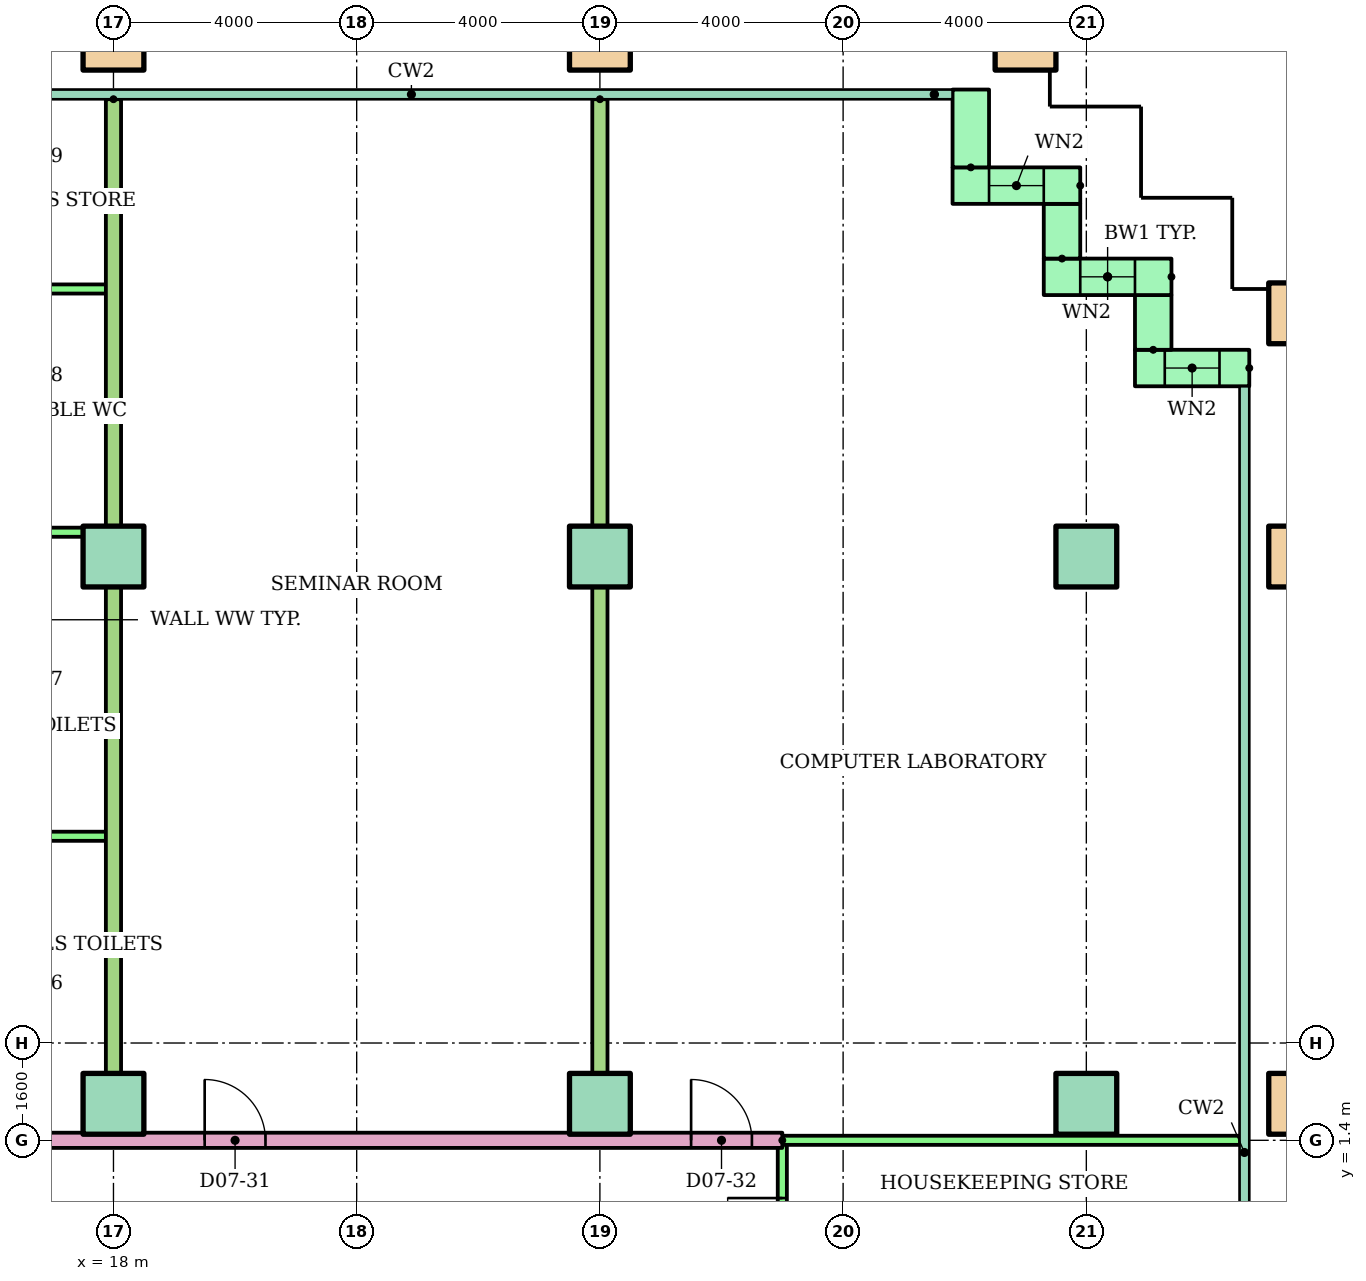
"""IFC4 building model, lengths in metres.
Left out: names, types, materials, properties, quantities, classifications, styles, units other than length and angle.
Written with IfcOpenShell. Run it as: python <this file> out.ifc"""

import sys

from ifc_helpers import new_model, si_unit, direction, frame, frame_2d, origin, origin_2d, place, context, subcontext, project, spatial, rectangle, hollow_rectangle, extrude, element, fill, save


model = new_model("IFC4")
c1 = context("Model", 3, precision=1e-05, world=origin(), true_north=direction((0.0, 1.0)))
c2 = subcontext(c1, "Body", "Model", "MODEL_VIEW")
j1 = project(units=[si_unit("LENGTHUNIT", "METRE"), si_unit("PLANEANGLEUNIT", "RADIAN")], contexts=[c1])
p1 = place(None, origin())
s1 = spatial("IfcSite", under=j1, at=p1, CompositionType="ELEMENT")
p2 = place(p1, origin())
s2 = spatial("IfcBuilding", under=s1, at=p2, CompositionType="ELEMENT")
p3 = place(p2, frame((0.0, 0.0, 29.9)))
s3 = spatial("IfcBuildingStorey", under=s2, at=p3, CompositionType="ELEMENT", Elevation=29.9)
for number, where in (
    (1, (18.0, 2.0, 0.0)),
    (2, (26.0, 2.0, 0.0)),
    (3, (34.0, 2.0, 0.0)),
):
    element("IfcColumn", number, at=place(p3, frame(where)), inside=s3, PredefinedType="COLUMN", context=c2, shape_type="SweptSolid", body=[
        extrude(rectangle(XDim=1.0, YDim=1.0, at=origin_2d()), origin(), (0.0, 0.0, 1.0), 3.9),
    ])
p4 = place(p3, frame((37.5, 2.0, 0.0)))
e4 = element("IfcColumn", 4, at=p4, inside=s3, PredefinedType="COLUMN", context=c2, shape_type="SweptSolid", body=[
    extrude(hollow_rectangle(XDim=1.0, YDim=1.0, WallThickness=0.05, at=origin_2d()), origin(), (0.0, 0.0, 1.0), 3.9),
])
for number, where in (
    (5, (18.0, 11.0, 0.0)),
    (6, (26.0, 11.0, 0.0)),
    (7, (34.0, 11.0, 0.0)),
):
    element("IfcColumn", number, at=place(p3, frame(where)), inside=s3, PredefinedType="COLUMN", context=c2, shape_type="SweptSolid", body=[
        extrude(rectangle(XDim=1.0, YDim=1.0, at=origin_2d()), origin(), (0.0, 0.0, 1.0), 3.9),
    ])
for number, where in (
    (8, (37.5, 11.0, 0.0)),
    (9, (37.5, 15.0, 0.0)),
    (10, (18.0, 19.5, 0.0)),
    (11, (26.0, 19.5, 0.0)),
    (12, (33.0, 19.5, 0.0)),
):
    element("IfcColumn", number, at=place(p3, frame(where)), inside=s3, PredefinedType="COLUMN", context=c2, shape_type="SweptSolid", body=[
        extrude(hollow_rectangle(XDim=1.0, YDim=1.0, WallThickness=0.05, at=origin_2d()), origin(), (0.0, 0.0, 1.0), 3.9),
    ])
p5 = place(p3, frame((36.68, 14.1, 0.0), z_axis=(0.0, 0.0, 1.0), x_axis=(-1.0, 0.0, 0.0)))
e13 = element("IfcWall", 13, at=p5, inside=s3, PredefinedType="STANDARD", context=c2, shape_type="SweptSolid", body=[
    extrude(rectangle(XDim=1.88, YDim=0.6, at=frame_2d((0.94, 0.0))), origin(), (0.0, 0.0, 1.0), 3.6),
])
p6 = place(p5, frame((0.49, 0.0, 0.9)))
e14 = element("IfcOpeningElement", 14, at=p6, cuts=e13, PredefinedType="OPENING", context=c2, shape_type="SweptSolid", body=[
    extrude(rectangle(XDim=0.9, YDim=1.8, at=frame_2d((0.45, 0.9))), frame((0.0, 0.31, 0.0), z_axis=(0.0, -1.0, 0.0), x_axis=(1.0, 0.0, 0.0)), (0.0, 0.0, 1.0), 0.62),
])
p7 = place(p3, frame((35.1, 14.4, 0.0), z_axis=(0.0, 0.0, 1.0), x_axis=(0.0, 1.0, 0.0)))
e15 = element("IfcWall", 15, at=p7, inside=s3, PredefinedType="STANDARD", context=c2, shape_type="SweptSolid", body=[
    extrude(rectangle(XDim=0.9, YDim=0.6, at=frame_2d((0.45, 0.0))), origin(), (0.0, 0.0, 1.0), 3.6),
])
p8 = place(p3, frame((35.4, 15.6, 0.0), z_axis=(0.0, 0.0, 1.0), x_axis=(-1.0, 0.0, 0.0)))
e16 = element("IfcWall", 16, at=p8, inside=s3, PredefinedType="STANDARD", context=c2, shape_type="SweptSolid", body=[
    extrude(rectangle(XDim=2.1, YDim=0.6, at=frame_2d((1.05, 0.0))), origin(), (0.0, 0.0, 1.0), 3.6),
])
p9 = place(p8, frame((0.6, 0.0, 0.9)))
e17 = element("IfcOpeningElement", 17, at=p9, cuts=e16, PredefinedType="OPENING", context=c2, shape_type="SweptSolid", body=[
    extrude(rectangle(XDim=0.9, YDim=1.8, at=frame_2d((0.45, 0.9))), frame((0.0, 0.31, 0.0), z_axis=(0.0, -1.0, 0.0), x_axis=(1.0, 0.0, 0.0)), (0.0, 0.0, 1.0), 0.62),
])
p10 = place(p3, frame((33.6, 15.9, 0.0), z_axis=(0.0, 0.0, 1.0), x_axis=(0.0, 1.0, 0.0)))
e18 = element("IfcWall", 18, at=p10, inside=s3, PredefinedType="STANDARD", context=c2, shape_type="SweptSolid", body=[
    extrude(rectangle(XDim=0.9, YDim=0.6, at=frame_2d((0.45, 0.0))), origin(), (0.0, 0.0, 1.0), 3.6),
])
p11 = place(p3, frame((33.9, 17.1, 0.0), z_axis=(0.0, 0.0, 1.0), x_axis=(-1.0, 0.0, 0.0)))
e19 = element("IfcWall", 19, at=p11, inside=s3, PredefinedType="STANDARD", context=c2, shape_type="SweptSolid", body=[
    extrude(rectangle(XDim=2.1, YDim=0.6, at=frame_2d((1.05, 0.0))), origin(), (0.0, 0.0, 1.0), 3.6),
])
p12 = place(p11, frame((0.6, 0.0, 0.9)))
e20 = element("IfcOpeningElement", 20, at=p12, cuts=e19, PredefinedType="OPENING", context=c2, shape_type="SweptSolid", body=[
    extrude(rectangle(XDim=0.9, YDim=1.8, at=frame_2d((0.45, 0.9))), frame((0.0, 0.31, 0.0), z_axis=(0.0, -1.0, 0.0), x_axis=(1.0, 0.0, 0.0)), (0.0, 0.0, 1.0), 0.62),
])
p13 = place(p3, frame((32.1, 17.4, 0.0), z_axis=(0.0, 0.0, 1.0), x_axis=(0.0, 1.0, 0.0)))
e21 = element("IfcWall", 21, at=p13, inside=s3, PredefinedType="STANDARD", context=c2, shape_type="SweptSolid", body=[
    extrude(rectangle(XDim=1.28, YDim=0.6, at=frame_2d((0.64, 0.0))), origin(), (0.0, 0.0, 1.0), 3.6),
])
p14 = place(p3, frame((29.0, -1.4, 0.0), z_axis=(0.0, 0.0, 1.0), x_axis=(0.0, 1.0, 0.0)))
e22 = element("IfcWall", 22, at=p14, inside=s3, PredefinedType="PARTITIONING", context=c2, shape_type="SweptSolid", body=[
    extrude(rectangle(XDim=2.8, YDim=0.15, at=frame_2d((1.4, 0.0))), origin(), (0.0, 0.0, 1.0), 3.1),
])
p15 = place(p14, frame((0.95, 0.0, 0.0)))
e23 = element("IfcOpeningElement", 23, at=p15, cuts=e22, PredefinedType="OPENING", context=c2, shape_type="SweptSolid", body=[
    extrude(rectangle(XDim=0.9, YDim=2.1, at=frame_2d((0.45, 1.05))), frame((0.0, 0.085, 0.0), z_axis=(0.0, -1.0, 0.0), x_axis=(1.0, 0.0, 0.0)), (0.0, 0.0, 1.0), 0.17),
])
p16 = place(p3, frame((14.0, 1.4, 0.0)))
e24 = element("IfcWall", 24, at=p16, inside=s3, PredefinedType="PARTITIONING", context=c2, shape_type="SweptSolid", body=[
    extrude(rectangle(XDim=15.0, YDim=0.25, at=frame_2d((7.5, 0.0))), origin(), (0.0, 0.0, 1.0), 3.1),
])
p17 = place(p16, frame((0.3, 0.0, 0.0)))
e25 = element("IfcOpeningElement", 25, at=p17, cuts=e24, PredefinedType="OPENING", context=c2, shape_type="SweptSolid", body=[
    extrude(rectangle(XDim=1.0, YDim=2.1, at=frame_2d((0.5, 1.05))), frame((0.0, 0.135, 0.0), z_axis=(0.0, -1.0, 0.0), x_axis=(1.0, 0.0, 0.0)), (0.0, 0.0, 1.0), 0.27),
])
p18 = place(p16, frame((5.5, 0.0, 0.0)))
e26 = element("IfcOpeningElement", 26, at=p18, cuts=e24, PredefinedType="OPENING", context=c2, shape_type="SweptSolid", body=[
    extrude(rectangle(XDim=1.0, YDim=2.1, at=frame_2d((0.5, 1.05))), frame((0.0, 0.135, 0.0), z_axis=(0.0, -1.0, 0.0), x_axis=(1.0, 0.0, 0.0)), (0.0, 0.0, 1.0), 0.27),
])
p19 = place(p16, frame((13.5, 0.0, 0.0)))
e27 = element("IfcOpeningElement", 27, at=p19, cuts=e24, PredefinedType="OPENING", context=c2, shape_type="SweptSolid", body=[
    extrude(rectangle(XDim=1.0, YDim=2.1, at=frame_2d((0.5, 1.05))), frame((0.0, 0.135, 0.0), z_axis=(0.0, -1.0, 0.0), x_axis=(1.0, 0.0, 0.0)), (0.0, 0.0, 1.0), 0.27),
])
p20 = place(p3, frame((29.0, 1.4, 0.0)))
e28 = element("IfcWall", 28, at=p20, inside=s3, PredefinedType="PARTITIONING", context=c2, shape_type="SweptSolid", body=[
    extrude(rectangle(XDim=7.53, YDim=0.15, at=frame_2d((3.765, 0.0))), origin(), (0.0, 0.0, 1.0), 3.1),
])
for number, where in (
    (29, (15.6, 6.4, 0.0)),
    (30, (15.6, 11.4, 0.0)),
    (31, (15.6, 15.4, 0.0)),
):
    element("IfcWall", number, at=place(p3, frame(where)), inside=s3, PredefinedType="PARTITIONING", context=c2, shape_type="SweptSolid", body=[
        extrude(rectangle(XDim=2.4, YDim=0.15, at=frame_2d((1.2, 0.0))), origin(), (0.0, 0.0, 1.0), 3.1),
    ])
for number, where, z_axis, x_axis in (
    (32, (18.0, 18.521, 0.0), (0.0, 0.0, 1.0), (0.0, -1.0, 0.0)),
    (33, (26.0, 18.521, 0.0), (0.0, 0.0, 1.0), (0.0, -1.0, 0.0)),
):
    element("IfcWall", number, at=place(p3, frame(where, z_axis=z_axis, x_axis=x_axis)), inside=s3, PredefinedType="PARTITIONING", context=c2, shape_type="SweptSolid", body=[
        extrude(rectangle(XDim=17.121, YDim=0.25, at=frame_2d((8.561, 0.0))), origin(), (0.0, 0.0, 1.0), 3.1),
    ])
p21 = place(p6, origin())
e34 = element("IfcWindow", 34, at=p21, inside=s3, PartitioningType="SINGLE_PANEL", PredefinedType="WINDOW", context=c2, shape_type="SweptSolid", body=[
    extrude(rectangle(XDim=0.9, YDim=1.8, at=frame_2d((0.45, 0.9))), frame((0.0, 0.03, 0.0), z_axis=(0.0, -1.0, 0.0), x_axis=(1.0, 0.0, 0.0)), (0.0, 0.0, 1.0), 0.06),
])
fill(e14, e34)
p22 = place(p9, origin())
e35 = element("IfcWindow", 35, at=p22, inside=s3, PartitioningType="SINGLE_PANEL", PredefinedType="WINDOW", context=c2, shape_type="SweptSolid", body=[
    extrude(rectangle(XDim=0.9, YDim=1.8, at=frame_2d((0.45, 0.9))), frame((0.0, 0.03, 0.0), z_axis=(0.0, -1.0, 0.0), x_axis=(1.0, 0.0, 0.0)), (0.0, 0.0, 1.0), 0.06),
])
fill(e17, e35)
p23 = place(p12, origin())
e36 = element("IfcWindow", 36, at=p23, inside=s3, PartitioningType="SINGLE_PANEL", PredefinedType="WINDOW", context=c2, shape_type="SweptSolid", body=[
    extrude(rectangle(XDim=0.9, YDim=1.8, at=frame_2d((0.45, 0.9))), frame((0.0, 0.03, 0.0), z_axis=(0.0, -1.0, 0.0), x_axis=(1.0, 0.0, 0.0)), (0.0, 0.0, 1.0), 0.06),
])
fill(e20, e36)
p24 = place(p15, origin())
e37 = element("IfcDoor", 37, at=p24, inside=s3, OperationType="SINGLE_SWING_RIGHT", PredefinedType="DOOR", context=c2, shape_type="SweptSolid", body=[
    extrude(rectangle(XDim=0.9, YDim=2.1, at=frame_2d((0.45, 1.05))), frame((0.0, 0.025, 0.0), z_axis=(0.0, -1.0, 0.0), x_axis=(1.0, 0.0, 0.0)), (0.0, 0.0, 1.0), 0.05),
])
fill(e23, e37)
p25 = place(p18, origin())
e38 = element("IfcDoor", 38, at=p25, inside=s3, OperationType="SINGLE_SWING_LEFT", PredefinedType="DOOR", context=c2, shape_type="SweptSolid", body=[
    extrude(rectangle(XDim=1.0, YDim=2.1, at=frame_2d((0.5, 1.05))), frame((0.0, 0.025, 0.0), z_axis=(0.0, -1.0, 0.0), x_axis=(1.0, 0.0, 0.0)), (0.0, 0.0, 1.0), 0.05),
])
fill(e26, e38)
p26 = place(p19, origin())
e39 = element("IfcDoor", 39, at=p26, inside=s3, OperationType="SINGLE_SWING_LEFT", PredefinedType="DOOR", context=c2, shape_type="SweptSolid", body=[
    extrude(rectangle(XDim=1.0, YDim=2.1, at=frame_2d((0.5, 1.05))), frame((0.0, 0.025, 0.0), z_axis=(0.0, -1.0, 0.0), x_axis=(1.0, 0.0, 0.0)), (0.0, 0.0, 1.0), 0.05),
])
fill(e27, e39)
save(model, sys.argv[1])
